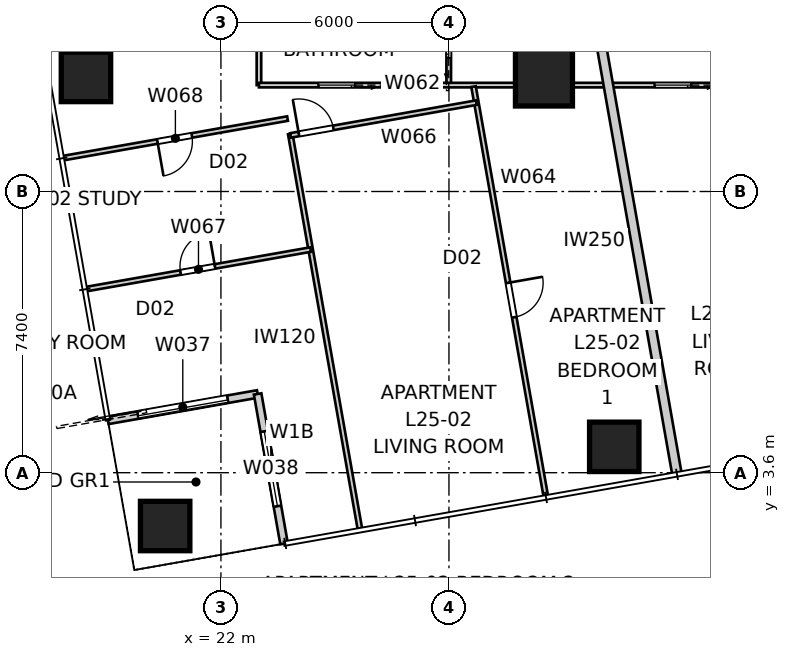
"""IFC4 building model, lengths in metres.
Left out: names, types, materials, properties, quantities, classifications, styles, units other than length and angle.
Written with IfcOpenShell. Run it as: python <this file> out.ifc"""

import sys

from ifc_helpers import new_model, si_unit, direction, frame, frame_2d, origin, origin_2d, place, context, subcontext, project, spatial, rectangle, extrude, element, fill, save


model = new_model("IFC4")
c1 = context("Model", 3, precision=1e-05, world=origin(), true_north=direction((0.0, 1.0)))
c2 = subcontext(c1, "Body", "Model", "MODEL_VIEW")
j1 = project(units=[si_unit("LENGTHUNIT", "METRE"), si_unit("PLANEANGLEUNIT", "RADIAN")], contexts=[c1])
p1 = place(None, origin())
s1 = spatial("IfcSite", under=j1, at=p1, CompositionType="ELEMENT")
p2 = place(p1, origin())
s2 = spatial("IfcBuilding", under=s1, at=p2, CompositionType="ELEMENT")
p3 = place(p2, frame((0.0, 0.0, 93.0)))
s3 = spatial("IfcBuildingStorey", under=s2, at=p3, CompositionType="ELEMENT", Elevation=93.0)
for number, where, z_axis, x_axis in (
    (1, (20.532, 2.197, 0.0), (0.0, 0.0, 1.0), (1.0, 0.0, 0.0)),
    (2, (32.35, 4.281, 0.0), (0.0, 0.0, 1.0), (1.0, 0.0, 0.0)),
    (3, (18.448, 14.015, 0.0), (0.0, 0.0, 1.0), (1.0, 0.0, 0.0)),
):
    element("IfcColumn", number, at=place(p3, frame(where, z_axis=z_axis, x_axis=x_axis)), inside=s3, PredefinedType="COLUMN", context=c2, shape_type="SweptSolid", body=[
        extrude(rectangle(XDim=1.3, YDim=1.3, at=origin_2d()), origin(), (0.0, 0.0, 1.0), 3.4),
    ])
p4 = place(p3, frame((30.5, 14.0, 0.0), z_axis=(0.0, 0.0, 1.0), x_axis=(1.0, 0.0, 0.0)))
e4 = element("IfcColumn", 4, at=p4, inside=s3, PredefinedType="COLUMN", context=c2, shape_type="SweptSolid", body=[
    extrude(rectangle(XDim=1.5, YDim=1.5, at=origin_2d()), origin(), (0.0, 0.0, 1.0), 3.4),
])
p5 = place(p3, frame((19.026, 4.978, 0.0), z_axis=(0.0, 0.0, 1.0), x_axis=(0.984808127031, 0.173646056486, 0.0)))
e5 = element("IfcWall", 5, at=p5, inside=s3, PredefinedType="SOLIDWALL", context=c2, shape_type="SweptSolid", body=[
    extrude(rectangle(XDim=4.0, YDim=0.2, at=frame_2d((2.0, 0.0))), origin(), (0.0, 0.0, 1.0), 3.25),
])
p6 = place(p5, frame((0.8, 0.0, 0.0)))
e6 = element("IfcOpeningElement", 6, at=p6, cuts=e5, PredefinedType="OPENING", context=c2, shape_type="SweptSolid", body=[
    extrude(rectangle(XDim=2.4, YDim=2.1, at=frame_2d((1.2, 1.05))), frame((0.0, 0.11, 0.0), z_axis=(0.0, -1.0, 0.0), x_axis=(1.0, 0.0, 0.0)), (0.0, 0.0, 1.0), 0.22),
])
p7 = place(p3, frame((22.966, 5.672, 0.0), z_axis=(0.0, 0.0, 1.0), x_axis=(0.173646056486, -0.984808127031, 0.0)))
e7 = element("IfcWall", 7, at=p7, inside=s3, PredefinedType="SOLIDWALL", context=c2, shape_type="SweptSolid", body=[
    extrude(rectangle(XDim=4.0, YDim=0.2, at=frame_2d((2.0, 0.0))), origin(), (0.0, 0.0, 1.0), 3.25),
])
p8 = place(p7, frame((1.0, 0.0, 0.45)))
e8 = element("IfcOpeningElement", 8, at=p8, cuts=e7, PredefinedType="OPENING", context=c2, shape_type="SweptSolid", body=[
    extrude(rectangle(XDim=2.0, YDim=1.8, at=frame_2d((1.0, 0.9))), frame((0.0, 0.11, 0.0), z_axis=(0.0, -1.0, 0.0), x_axis=(1.0, 0.0, 0.0)), (0.0, 0.0, 1.0), 0.22),
])
p9 = place(p3, frame((34.001, 3.556, 0.0), z_axis=(0.0, 0.0, 1.0), x_axis=(-0.173639088111, 0.984809355703, 0.0)))
e9 = element("IfcWall", 9, at=p9, inside=s3, PredefinedType="PARTITIONING", context=c2, shape_type="SweptSolid", body=[
    extrude(rectangle(XDim=12.857, YDim=0.25, at=frame_2d((6.428, 0.0))), origin(), (0.0, 0.0, 1.0), 3.25),
])
p10 = place(p3, frame((23.0, 13.8, 0.0), z_axis=(0.0, 0.0, 1.0), x_axis=(0.0, 1.0, 0.0)))
e10 = element("IfcWall", 10, at=p10, inside=s3, PredefinedType="PARTITIONING", context=c2, shape_type="SweptSolid", body=[
    extrude(rectangle(XDim=6.094, YDim=0.12, at=frame_2d((3.047, 0.0))), origin(), (0.0, 0.0, 1.0), 3.25),
])
p11 = place(p10, frame((3.857, 0.0, 0.0)))
e11 = element("IfcOpeningElement", 11, at=p11, cuts=e10, PredefinedType="OPENING", context=c2, shape_type="SweptSolid", body=[
    extrude(rectangle(XDim=0.92, YDim=2.34, at=frame_2d((0.46, 1.17))), frame((0.0, 0.07, 0.0), z_axis=(0.0, -1.0, 0.0), x_axis=(1.0, 0.0, 0.0)), (0.0, 0.0, 1.0), 0.14),
])
p12 = place(p3, frame((27.995, 13.8, 0.0), z_axis=(0.0, 0.0, 1.0), x_axis=(0.0, 1.0, 0.0)))
e12 = element("IfcWall", 12, at=p12, inside=s3, PredefinedType="PARTITIONING", context=c2, shape_type="SweptSolid", body=[
    extrude(rectangle(XDim=2.4, YDim=0.12, at=frame_2d((1.2, 0.0))), origin(), (0.0, 0.0, 1.0), 3.25),
])
p13 = place(p12, frame((0.72, 0.0, 0.0)))
e13 = element("IfcOpeningElement", 13, at=p13, cuts=e12, PredefinedType="OPENING", context=c2, shape_type="SweptSolid", body=[
    extrude(rectangle(XDim=0.96, YDim=2.1, at=frame_2d((0.48, 1.05))), frame((0.0, 0.07, 0.0), z_axis=(0.0, -1.0, 0.0), x_axis=(1.0, 0.0, 0.0)), (0.0, 0.0, 1.0), 0.14),
])
p14 = place(p3, frame((57.0, 13.8, 0.0), z_axis=(0.0, 0.0, 1.0), x_axis=(-1.0, 0.0, 0.0)))
e14 = element("IfcWall", 14, at=p14, inside=s3, PredefinedType="PARTITIONING", context=c2, shape_type="SweptSolid", body=[
    extrude(rectangle(XDim=34.0, YDim=0.12, at=frame_2d((17.0, 0.0))), origin(), (0.0, 0.0, 1.0), 2.55),
])
p15 = place(p14, frame((8.768, 0.0, 0.0)))
e15 = element("IfcOpeningElement", 15, at=p15, cuts=e14, PredefinedType="OPENING", context=c2, shape_type="SweptSolid", body=[
    extrude(rectangle(XDim=0.92, YDim=2.34, at=frame_2d((0.46, 1.17))), frame((0.0, 0.07, 0.0), z_axis=(0.0, -1.0, 0.0), x_axis=(1.0, 0.0, 0.0)), (0.0, 0.0, 1.0), 0.14),
])
p16 = place(p14, frame((10.995, 0.0, 0.0)))
e16 = element("IfcOpeningElement", 16, at=p16, cuts=e14, PredefinedType="OPENING", context=c2, shape_type="SweptSolid", body=[
    extrude(rectangle(XDim=0.92, YDim=2.34, at=frame_2d((0.46, 1.17))), frame((0.0, 0.07, 0.0), z_axis=(0.0, -1.0, 0.0), x_axis=(1.0, 0.0, 0.0)), (0.0, 0.0, 1.0), 0.14),
])
p17 = place(p14, frame((15.486, 0.0, 0.0)))
e17 = element("IfcOpeningElement", 17, at=p17, cuts=e14, PredefinedType="OPENING", context=c2, shape_type="SweptSolid", body=[
    extrude(rectangle(XDim=0.92, YDim=2.34, at=frame_2d((0.46, 1.17))), frame((0.0, 0.07, 0.0), z_axis=(0.0, -1.0, 0.0), x_axis=(1.0, 0.0, 0.0)), (0.0, 0.0, 1.0), 0.14),
])
p18 = place(p14, frame((4.804, 0.0, 0.0)))
e18 = element("IfcOpeningElement", 18, at=p18, cuts=e14, PredefinedType="OPENING", context=c2, shape_type="SweptSolid", body=[
    extrude(rectangle(XDim=0.96, YDim=2.1, at=frame_2d((0.48, 1.05))), frame((0.0, 0.07, 0.0), z_axis=(0.0, -1.0, 0.0), x_axis=(1.0, 0.0, 0.0)), (0.0, 0.0, 1.0), 0.14),
])
p19 = place(p14, frame((19.155, 0.0, 0.0)))
e19 = element("IfcOpeningElement", 19, at=p19, cuts=e14, PredefinedType="OPENING", context=c2, shape_type="SweptSolid", body=[
    extrude(rectangle(XDim=0.96, YDim=2.1, at=frame_2d((0.48, 1.05))), frame((0.0, 0.07, 0.0), z_axis=(0.0, -1.0, 0.0), x_axis=(1.0, 0.0, 0.0)), (0.0, 0.0, 1.0), 0.14),
])
p20 = place(p14, frame((31.473, 0.0, 0.0)))
e20 = element("IfcOpeningElement", 20, at=p20, cuts=e14, PredefinedType="OPENING", context=c2, shape_type="SweptSolid", body=[
    extrude(rectangle(XDim=0.96, YDim=2.1, at=frame_2d((0.48, 1.05))), frame((0.0, 0.07, 0.0), z_axis=(0.0, -1.0, 0.0), x_axis=(1.0, 0.0, 0.0)), (0.0, 0.0, 1.0), 0.14),
])
p21 = place(p14, frame((1.261, 0.0, 0.0)))
e21 = element("IfcOpeningElement", 21, at=p21, cuts=e14, PredefinedType="OPENING", context=c2, shape_type="SweptSolid", body=[
    extrude(rectangle(XDim=0.96, YDim=2.1, at=frame_2d((0.48, 1.05))), frame((0.0, 0.07, 0.0), z_axis=(0.0, -1.0, 0.0), x_axis=(1.0, 0.0, 0.0)), (0.0, 0.0, 1.0), 0.14),
])
p22 = place(p14, frame((22.627, 0.0, 0.0)))
e22 = element("IfcOpeningElement", 22, at=p22, cuts=e14, PredefinedType="OPENING", context=c2, shape_type="SweptSolid", body=[
    extrude(rectangle(XDim=0.96, YDim=2.1, at=frame_2d((0.48, 1.05))), frame((0.0, 0.07, 0.0), z_axis=(0.0, -1.0, 0.0), x_axis=(1.0, 0.0, 0.0)), (0.0, 0.0, 1.0), 0.14),
])
p23 = place(p3, frame((28.648, 13.76, 0.0), z_axis=(0.0, 0.0, 1.0), x_axis=(0.173632532564, -0.984810511538, 0.0)))
e23 = element("IfcWall", 23, at=p23, inside=s3, PredefinedType="PARTITIONING", context=c2, shape_type="SweptSolid", body=[
    extrude(rectangle(XDim=10.938, YDim=0.12, at=frame_2d((5.469, 0.0))), origin(), (0.0, 0.0, 1.0), 2.638),
])
p24 = place(p23, frame((5.243, 0.0, 0.0)))
e24 = element("IfcOpeningElement", 24, at=p24, cuts=e23, PredefinedType="OPENING", context=c2, shape_type="SweptSolid", body=[
    extrude(rectangle(XDim=0.92, YDim=2.34, at=frame_2d((0.46, 1.17))), frame((0.0, 0.07, 0.0), z_axis=(0.0, -1.0, 0.0), x_axis=(1.0, 0.0, 0.0)), (0.0, 0.0, 1.0), 0.14),
])
p25 = place(p3, frame((25.656, 2.126, 0.0), z_axis=(0.0, 0.0, 1.0), x_axis=(-0.173653317458, 0.984806846715, 0.0)))
e25 = element("IfcWall", 25, at=p25, inside=s3, PredefinedType="PARTITIONING", context=c2, shape_type="SweptSolid", body=[
    extrude(rectangle(XDim=10.55, YDim=0.12, at=frame_2d((5.275, 0.0))), origin(), (0.0, 0.0, 1.0), 3.25),
])
p26 = place(p3, frame((23.831, 12.476, 0.0), z_axis=(0.0, 0.0, 1.0), x_axis=(0.984810765884, 0.173631089957, 0.0)))
e26 = element("IfcWall", 26, at=p26, inside=s3, PredefinedType="PARTITIONING", context=c2, shape_type="SweptSolid", body=[
    extrude(rectangle(XDim=4.966, YDim=0.12, at=frame_2d((2.483, 0.0))), origin(), (0.0, 0.0, 1.0), 3.25),
])
p27 = place(p26, frame((0.223, 0.0, 0.0)))
e27 = element("IfcOpeningElement", 27, at=p27, cuts=e26, PredefinedType="OPENING", context=c2, shape_type="SweptSolid", body=[
    extrude(rectangle(XDim=0.92, YDim=2.34, at=frame_2d((0.46, 1.17))), frame((0.0, 0.07, 0.0), z_axis=(0.0, -1.0, 0.0), x_axis=(1.0, 0.0, 0.0)), (0.0, 0.0, 1.0), 0.14),
])
p28 = place(p3, frame((18.458, 8.432, 0.0), z_axis=(0.0, 0.0, 1.0), x_axis=(0.984806924634, 0.173652875567, 0.0)))
e28 = element("IfcWall", 28, at=p28, inside=s3, PredefinedType="PARTITIONING", context=c2, shape_type="SweptSolid", body=[
    extrude(rectangle(XDim=5.993, YDim=0.12, at=frame_2d((2.997, 0.0))), origin(), (0.0, 0.0, 1.0), 3.25),
])
p29 = place(p28, frame((2.517, 0.0, 0.0)))
e29 = element("IfcOpeningElement", 29, at=p29, cuts=e28, PredefinedType="OPENING", context=c2, shape_type="SweptSolid", body=[
    extrude(rectangle(XDim=0.92, YDim=2.34, at=frame_2d((0.46, 1.17))), frame((0.0, 0.07, 0.0), z_axis=(0.0, -1.0, 0.0), x_axis=(1.0, 0.0, 0.0)), (0.0, 0.0, 1.0), 0.14),
])
p30 = place(p3, frame((23.753, 12.919, 0.0), z_axis=(0.0, 0.0, 1.0), x_axis=(-0.984806924634, -0.173652875567, 0.0)))
e30 = element("IfcWall", 30, at=p30, inside=s3, PredefinedType="PARTITIONING", context=c2, shape_type="SweptSolid", body=[
    extrude(rectangle(XDim=5.993, YDim=0.12, at=frame_2d((2.997, 0.0))), origin(), (0.0, 0.0, 1.0), 2.638),
])
p31 = place(p30, frame((2.557, 0.0, 0.0)))
e31 = element("IfcOpeningElement", 31, at=p31, cuts=e30, PredefinedType="OPENING", context=c2, shape_type="SweptSolid", body=[
    extrude(rectangle(XDim=0.92, YDim=2.34, at=frame_2d((0.46, 1.17))), frame((0.0, 0.07, 0.0), z_axis=(0.0, -1.0, 0.0), x_axis=(1.0, 0.0, 0.0)), (0.0, 0.0, 1.0), 0.14),
])
p32 = place(p6, origin())
e32 = element("IfcDoor", 32, at=p32, inside=s3, OperationType="SLIDING_TO_LEFT", PredefinedType="DOOR", context=c2, shape_type="SweptSolid", body=[
    extrude(rectangle(XDim=2.4, YDim=2.1, at=frame_2d((1.2, 1.05))), frame((0.0, 0.025, 0.0), z_axis=(0.0, -1.0, 0.0), x_axis=(1.0, 0.0, 0.0)), (0.0, 0.0, 1.0), 0.05),
])
fill(e6, e32)
p33 = place(p8, origin())
e33 = element("IfcWindow", 33, at=p33, inside=s3, PartitioningType="SINGLE_PANEL", PredefinedType="WINDOW", context=c2, shape_type="SweptSolid", body=[
    extrude(rectangle(XDim=2.0, YDim=1.8, at=frame_2d((1.0, 0.9))), frame((0.0, 0.03, 0.0), z_axis=(0.0, -1.0, 0.0), x_axis=(1.0, 0.0, 0.0)), (0.0, 0.0, 1.0), 0.06),
])
fill(e8, e33)
p34 = place(p13, origin())
e34 = element("IfcDoor", 34, at=p34, inside=s3, OperationType="SLIDING_TO_LEFT", PredefinedType="DOOR", context=c2, shape_type="SweptSolid", body=[
    extrude(rectangle(XDim=0.96, YDim=2.1, at=frame_2d((0.48, 1.05))), frame((0.0, 0.025, 0.0), z_axis=(0.0, -1.0, 0.0), x_axis=(1.0, 0.0, 0.0)), (0.0, 0.0, 1.0), 0.05),
])
fill(e13, e34)
p35 = place(p20, origin())
e35 = element("IfcDoor", 35, at=p35, inside=s3, OperationType="SLIDING_TO_LEFT", PredefinedType="DOOR", context=c2, shape_type="SweptSolid", body=[
    extrude(rectangle(XDim=0.96, YDim=2.1, at=frame_2d((0.48, 1.05))), frame((0.0, 0.025, 0.0), z_axis=(0.0, -1.0, 0.0), x_axis=(1.0, 0.0, 0.0)), (0.0, 0.0, 1.0), 0.05),
])
fill(e20, e35)
p36 = place(p22, origin())
e36 = element("IfcDoor", 36, at=p36, inside=s3, OperationType="SLIDING_TO_LEFT", PredefinedType="DOOR", context=c2, shape_type="SweptSolid", body=[
    extrude(rectangle(XDim=0.96, YDim=2.1, at=frame_2d((0.48, 1.05))), frame((0.0, 0.025, 0.0), z_axis=(0.0, -1.0, 0.0), x_axis=(1.0, 0.0, 0.0)), (0.0, 0.0, 1.0), 0.05),
])
fill(e22, e36)
p37 = place(p31, origin())
e37 = element("IfcDoor", 37, at=p37, inside=s3, OperationType="SINGLE_SWING_RIGHT", PredefinedType="DOOR", context=c2, shape_type="SweptSolid", body=[
    extrude(rectangle(XDim=0.92, YDim=2.34, at=frame_2d((0.46, 1.17))), frame((0.0, 0.025, 0.0), z_axis=(0.0, -1.0, 0.0), x_axis=(1.0, 0.0, 0.0)), (0.0, 0.0, 1.0), 0.05),
])
fill(e31, e37)
p38 = place(p27, origin())
e38 = element("IfcDoor", 38, at=p38, inside=s3, OperationType="SINGLE_SWING_LEFT", PredefinedType="DOOR", context=c2, shape_type="SweptSolid", body=[
    extrude(rectangle(XDim=0.92, YDim=2.34, at=frame_2d((0.46, 1.17))), frame((0.0, 0.025, 0.0), z_axis=(0.0, -1.0, 0.0), x_axis=(1.0, 0.0, 0.0)), (0.0, 0.0, 1.0), 0.05),
])
fill(e27, e38)
p39 = place(p29, origin())
e39 = element("IfcDoor", 39, at=p39, inside=s3, OperationType="SINGLE_SWING_RIGHT", PredefinedType="DOOR", context=c2, shape_type="SweptSolid", body=[
    extrude(rectangle(XDim=0.92, YDim=2.34, at=frame_2d((0.46, 1.17))), frame((0.0, 0.025, 0.0), z_axis=(0.0, -1.0, 0.0), x_axis=(1.0, 0.0, 0.0)), (0.0, 0.0, 1.0), 0.05),
])
fill(e29, e39)
p40 = place(p24, origin())
e40 = element("IfcDoor", 40, at=p40, inside=s3, OperationType="SINGLE_SWING_LEFT", PredefinedType="DOOR", context=c2, shape_type="SweptSolid", body=[
    extrude(rectangle(XDim=0.92, YDim=2.34, at=frame_2d((0.46, 1.17))), frame((0.0, 0.025, 0.0), z_axis=(0.0, -1.0, 0.0), x_axis=(1.0, 0.0, 0.0)), (0.0, 0.0, 1.0), 0.05),
])
fill(e24, e40)
save(model, sys.argv[1])
